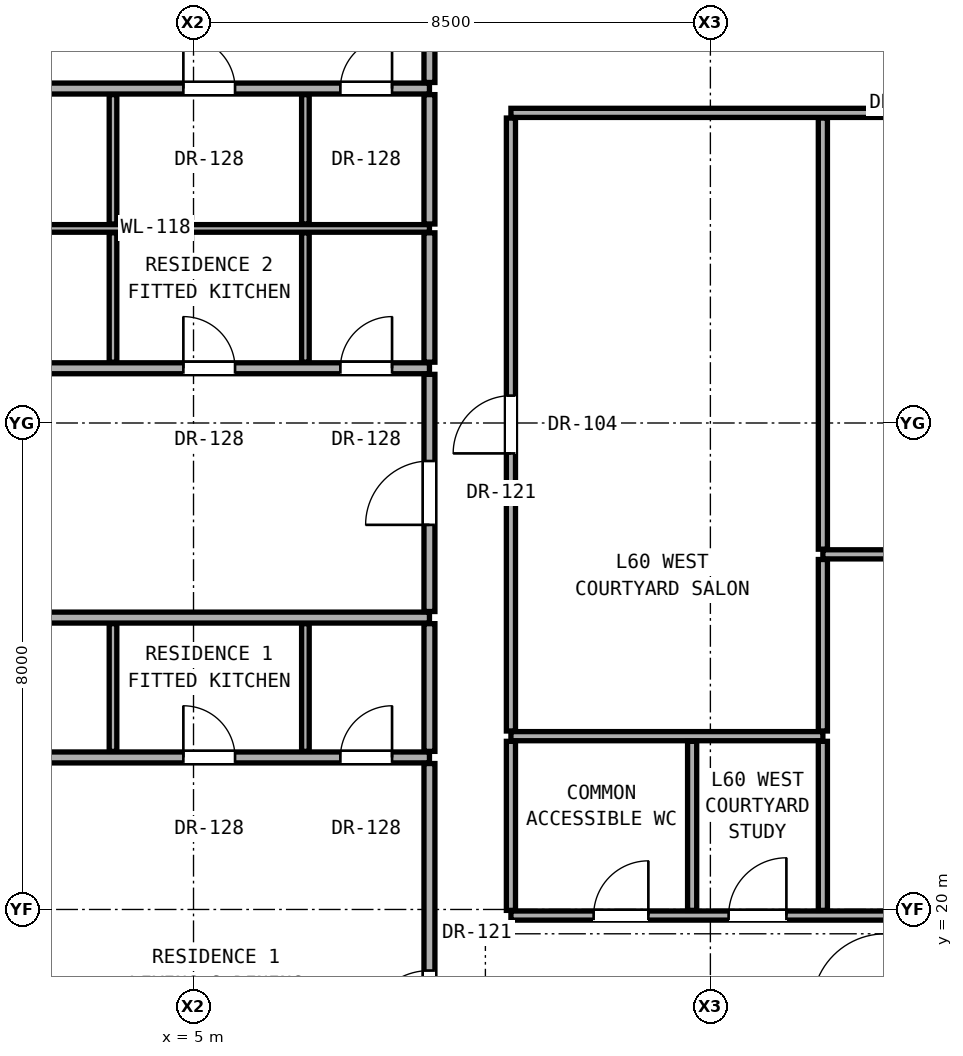
"""IFC4 building model, lengths in metres.
Left out: names, types, materials, properties, quantities, classifications, styles, units other than length and angle.
Written with IfcOpenShell. Run it as: python <this file> out.ifc"""

import sys

from ifc_helpers import new_model, si_unit, direction, frame, frame_2d, origin, place, context, subcontext, project, spatial, rectangle, extrude, element, fill, save


model = new_model("IFC4")
c1 = context("Model", 3, precision=1e-05, world=origin(), true_north=direction((0.0, 1.0)))
c2 = subcontext(c1, "Body", "Model", "MODEL_VIEW")
j1 = project(units=[si_unit("LENGTHUNIT", "METRE"), si_unit("PLANEANGLEUNIT", "RADIAN")], contexts=[c1])
p1 = place(None, origin())
s1 = spatial("IfcSite", under=j1, at=p1, CompositionType="ELEMENT")
p2 = place(p1, origin())
s2 = spatial("IfcBuilding", under=s1, at=p2, CompositionType="ELEMENT")
p3 = place(p2, frame((0.0, 0.0, 209.65)))
s3 = spatial("IfcBuildingStorey", under=s2, at=p3, CompositionType="ELEMENT", Elevation=209.65)
p4 = place(p3, frame((10.22, 19.9, 0.0), z_axis=(0.0, 0.0, 1.0), x_axis=(1.0, 0.0, 0.0)))
e1 = element("IfcWall", 1, at=p4, inside=s3, PredefinedType="PARTITIONING", context=c2, shape_type="SweptSolid", body=[
    extrude(rectangle(XDim=20.56, YDim=0.15, at=frame_2d((10.28, 0.0))), origin(), (0.0, 0.0, 1.0), 2.266),
])
p5 = place(p4, frame((1.36, 0.0, 0.0)))
e2 = element("IfcOpeningElement", 2, at=p5, cuts=e1, PredefinedType="OPENING", context=c2, shape_type="SweptSolid", body=[
    extrude(rectangle(XDim=0.9, YDim=2.1, at=frame_2d((0.45, 1.05))), frame((0.0, 0.085, 0.0), z_axis=(0.0, -1.0, 0.0), x_axis=(1.0, 0.0, 0.0)), (0.0, 0.0, 1.0), 0.17),
])
p6 = place(p4, frame((3.58, 0.0, 0.0)))
e3 = element("IfcOpeningElement", 3, at=p6, cuts=e1, PredefinedType="OPENING", context=c2, shape_type="SweptSolid", body=[
    extrude(rectangle(XDim=0.95, YDim=2.15, at=frame_2d((0.475, 1.075))), frame((0.0, 0.085, 0.0), z_axis=(0.0, -1.0, 0.0), x_axis=(1.0, 0.0, 0.0)), (0.0, 0.0, 1.0), 0.17),
])
p7 = place(p4, frame((8.926, 0.0, 0.0)))
e4 = element("IfcOpeningElement", 4, at=p7, cuts=e1, PredefinedType="OPENING", context=c2, shape_type="SweptSolid", body=[
    extrude(rectangle(XDim=1.05, YDim=2.2, at=frame_2d((0.525, 1.1))), frame((0.0, 0.085, 0.0), z_axis=(0.0, -1.0, 0.0), x_axis=(1.0, 0.0, 0.0)), (0.0, 0.0, 1.0), 0.17),
])
p8 = place(p4, frame((16.621, 0.0, 0.0)))
e5 = element("IfcOpeningElement", 5, at=p8, cuts=e1, PredefinedType="OPENING", context=c2, shape_type="SweptSolid", body=[
    extrude(rectangle(XDim=1.05, YDim=2.2, at=frame_2d((0.525, 1.1))), frame((0.0, 0.085, 0.0), z_axis=(0.0, -1.0, 0.0), x_axis=(1.0, 0.0, 0.0)), (0.0, 0.0, 1.0), 0.17),
])
p9 = place(p3, frame((-1.07, 22.5, 0.0), z_axis=(0.0, 0.0, 1.0), x_axis=(1.0, 0.0, 0.0)))
e6 = element("IfcWall", 6, at=p9, inside=s3, PredefinedType="PARTITIONING", context=c2, shape_type="SweptSolid", body=[
    extrude(rectangle(XDim=9.95, YDim=0.18, at=frame_2d((4.975, 0.0))), origin(), (0.0, 0.0, 1.0), 2.109),
])
p10 = place(p9, frame((1.968, 0.0, 0.0)))
e7 = element("IfcOpeningElement", 7, at=p10, cuts=e6, PredefinedType="OPENING", context=c2, shape_type="SweptSolid", body=[
    extrude(rectangle(XDim=0.85, YDim=2.01, at=frame_2d((0.425, 1.005))), frame((0.0, 0.1, 0.0), z_axis=(0.0, -1.0, 0.0), x_axis=(1.0, 0.0, 0.0)), (0.0, 0.0, 1.0), 0.2),
])
p11 = place(p9, frame((5.903, 0.0, 0.0)))
e8 = element("IfcOpeningElement", 8, at=p11, cuts=e6, PredefinedType="OPENING", context=c2, shape_type="SweptSolid", body=[
    extrude(rectangle(XDim=0.85, YDim=2.01, at=frame_2d((0.425, 1.005))), frame((0.0, 0.1, 0.0), z_axis=(0.0, -1.0, 0.0), x_axis=(1.0, 0.0, 0.0)), (0.0, 0.0, 1.0), 0.2),
])
p12 = place(p9, frame((8.485, 0.0, 0.0)))
e9 = element("IfcOpeningElement", 9, at=p12, cuts=e6, PredefinedType="OPENING", context=c2, shape_type="SweptSolid", body=[
    extrude(rectangle(XDim=0.85, YDim=2.01, at=frame_2d((0.425, 1.005))), frame((0.0, 0.1, 0.0), z_axis=(0.0, -1.0, 0.0), x_axis=(1.0, 0.0, 0.0)), (0.0, 0.0, 1.0), 0.2),
])
p13 = place(p3, frame((10.22, 22.85, 0.0), z_axis=(0.0, 0.0, 1.0), x_axis=(1.0, 0.0, 0.0)))
e10 = element("IfcWall", 10, at=p13, inside=s3, PredefinedType="PARTITIONING", context=c2, shape_type="SweptSolid", body=[
    extrude(rectangle(XDim=5.13, YDim=0.15, at=frame_2d((2.565, 0.0))), origin(), (0.0, 0.0, 1.0), 2.266),
])
p14 = place(p3, frame((-1.07, 24.8, 0.0), z_axis=(0.0, 0.0, 1.0), x_axis=(1.0, 0.0, 0.0)))
e11 = element("IfcWall", 11, at=p14, inside=s3, PredefinedType="PARTITIONING", context=c2, shape_type="SweptSolid", body=[
    extrude(rectangle(XDim=9.95, YDim=0.18, at=frame_2d((4.975, 0.0))), origin(), (0.0, 0.0, 1.0), 2.109),
])
p15 = place(p3, frame((15.35, 25.84, 0.0), z_axis=(0.0, 0.0, 1.0), x_axis=(1.0, 0.0, 0.0)))
e12 = element("IfcWall", 12, at=p15, inside=s3, PredefinedType="PARTITIONING", context=c2, shape_type="SweptSolid", body=[
    extrude(rectangle(XDim=15.43, YDim=0.15, at=frame_2d((7.715, 0.0))), origin(), (0.0, 0.0, 1.0), 2.266),
])
p16 = place(p3, frame((-1.07, 28.9, 0.0), z_axis=(0.0, 0.0, 1.0), x_axis=(1.0, 0.0, 0.0)))
e13 = element("IfcWall", 13, at=p16, inside=s3, PredefinedType="PARTITIONING", context=c2, shape_type="SweptSolid", body=[
    extrude(rectangle(XDim=9.95, YDim=0.18, at=frame_2d((4.975, 0.0))), origin(), (0.0, 0.0, 1.0), 2.109),
])
p17 = place(p16, frame((1.968, 0.0, 0.0)))
e14 = element("IfcOpeningElement", 14, at=p17, cuts=e13, PredefinedType="OPENING", context=c2, shape_type="SweptSolid", body=[
    extrude(rectangle(XDim=0.85, YDim=2.01, at=frame_2d((0.425, 1.005))), frame((0.0, 0.1, 0.0), z_axis=(0.0, -1.0, 0.0), x_axis=(1.0, 0.0, 0.0)), (0.0, 0.0, 1.0), 0.2),
])
p18 = place(p16, frame((5.903, 0.0, 0.0)))
e15 = element("IfcOpeningElement", 15, at=p18, cuts=e13, PredefinedType="OPENING", context=c2, shape_type="SweptSolid", body=[
    extrude(rectangle(XDim=0.85, YDim=2.01, at=frame_2d((0.425, 1.005))), frame((0.0, 0.1, 0.0), z_axis=(0.0, -1.0, 0.0), x_axis=(1.0, 0.0, 0.0)), (0.0, 0.0, 1.0), 0.2),
])
p19 = place(p16, frame((8.485, 0.0, 0.0)))
e16 = element("IfcOpeningElement", 16, at=p19, cuts=e13, PredefinedType="OPENING", context=c2, shape_type="SweptSolid", body=[
    extrude(rectangle(XDim=0.85, YDim=2.01, at=frame_2d((0.425, 1.005))), frame((0.0, 0.1, 0.0), z_axis=(0.0, -1.0, 0.0), x_axis=(1.0, 0.0, 0.0)), (0.0, 0.0, 1.0), 0.2),
])
p20 = place(p3, frame((-1.07, 31.2, 0.0), z_axis=(0.0, 0.0, 1.0), x_axis=(1.0, 0.0, 0.0)))
e17 = element("IfcWall", 17, at=p20, inside=s3, PredefinedType="PARTITIONING", context=c2, shape_type="SweptSolid", body=[
    extrude(rectangle(XDim=9.95, YDim=0.125, at=frame_2d((4.975, 0.0))), origin(), (0.0, 0.0, 1.0), 2.109),
])
p21 = place(p3, frame((10.22, 33.1, 0.0), z_axis=(0.0, 0.0, 1.0), x_axis=(1.0, 0.0, 0.0)))
e18 = element("IfcWall", 18, at=p21, inside=s3, PredefinedType="PARTITIONING", context=c2, shape_type="SweptSolid", body=[
    extrude(rectangle(XDim=20.56, YDim=0.15, at=frame_2d((10.28, 0.0))), origin(), (0.0, 0.0, 1.0), 2.266),
])
p22 = place(p21, frame((8.926, 0.0, 0.0)))
e19 = element("IfcOpeningElement", 19, at=p22, cuts=e18, PredefinedType="OPENING", context=c2, shape_type="SweptSolid", body=[
    extrude(rectangle(XDim=1.05, YDim=2.2, at=frame_2d((0.525, 1.1))), frame((0.0, 0.085, 0.0), z_axis=(0.0, -1.0, 0.0), x_axis=(1.0, 0.0, 0.0)), (0.0, 0.0, 1.0), 0.17),
])
p23 = place(p21, frame((16.621, 0.0, 0.0)))
e20 = element("IfcOpeningElement", 20, at=p23, cuts=e18, PredefinedType="OPENING", context=c2, shape_type="SweptSolid", body=[
    extrude(rectangle(XDim=1.05, YDim=2.2, at=frame_2d((0.525, 1.1))), frame((0.0, 0.085, 0.0), z_axis=(0.0, -1.0, 0.0), x_axis=(1.0, 0.0, 0.0)), (0.0, 0.0, 1.0), 0.17),
])
p24 = place(p3, frame((-1.07, 33.5, 0.0), z_axis=(0.0, 0.0, 1.0), x_axis=(1.0, 0.0, 0.0)))
e21 = element("IfcWall", 21, at=p24, inside=s3, PredefinedType="PARTITIONING", context=c2, shape_type="SweptSolid", body=[
    extrude(rectangle(XDim=9.95, YDim=0.18, at=frame_2d((4.975, 0.0))), origin(), (0.0, 0.0, 1.0), 2.109),
])
p25 = place(p24, frame((1.968, 0.0, 0.0)))
e22 = element("IfcOpeningElement", 22, at=p25, cuts=e21, PredefinedType="OPENING", context=c2, shape_type="SweptSolid", body=[
    extrude(rectangle(XDim=0.85, YDim=2.01, at=frame_2d((0.425, 1.005))), frame((0.0, 0.1, 0.0), z_axis=(0.0, -1.0, 0.0), x_axis=(1.0, 0.0, 0.0)), (0.0, 0.0, 1.0), 0.2),
])
p26 = place(p24, frame((5.903, 0.0, 0.0)))
e23 = element("IfcOpeningElement", 23, at=p26, cuts=e21, PredefinedType="OPENING", context=c2, shape_type="SweptSolid", body=[
    extrude(rectangle(XDim=0.85, YDim=2.01, at=frame_2d((0.425, 1.005))), frame((0.0, 0.1, 0.0), z_axis=(0.0, -1.0, 0.0), x_axis=(1.0, 0.0, 0.0)), (0.0, 0.0, 1.0), 0.2),
])
p27 = place(p24, frame((8.485, 0.0, 0.0)))
e24 = element("IfcOpeningElement", 24, at=p27, cuts=e21, PredefinedType="OPENING", context=c2, shape_type="SweptSolid", body=[
    extrude(rectangle(XDim=0.85, YDim=2.01, at=frame_2d((0.425, 1.005))), frame((0.0, 0.1, 0.0), z_axis=(0.0, -1.0, 0.0), x_axis=(1.0, 0.0, 0.0)), (0.0, 0.0, 1.0), 0.2),
])
p28 = place(p3, frame((3.676, 22.6, 0.0), z_axis=(0.0, 0.0, 1.0), x_axis=(0.0, 1.0, 0.0)))
e25 = element("IfcWall", 25, at=p28, inside=s3, PredefinedType="PARTITIONING", context=c2, shape_type="SweptSolid", body=[
    extrude(rectangle(XDim=2.1, YDim=0.125, at=frame_2d((1.05, 0.0))), origin(), (0.0, 0.0, 1.0), 2.266),
])
for number, where, z_axis, x_axis in (
    (26, (3.676, 29.0, 0.0), (0.0, 0.0, 1.0), (0.0, 1.0, 0.0)),
    (27, (3.676, 31.272, 0.0), (0.0, 0.0, 1.0), (0.0, 1.0, 0.0)),
):
    element("IfcWall", number, at=place(p3, frame(where, z_axis=z_axis, x_axis=x_axis)), inside=s3, PredefinedType="PARTITIONING", context=c2, shape_type="SweptSolid", body=[
        extrude(rectangle(XDim=2.127, YDim=0.125, at=frame_2d((1.064, 0.0))), origin(), (0.0, 0.0, 1.0), 2.266),
    ])
p29 = place(p3, frame((6.84, 22.6, 0.0), z_axis=(0.0, 0.0, 1.0), x_axis=(0.0, 1.0, 0.0)))
e28 = element("IfcWall", 28, at=p29, inside=s3, PredefinedType="PARTITIONING", context=c2, shape_type="SweptSolid", body=[
    extrude(rectangle(XDim=2.1, YDim=0.125, at=frame_2d((1.05, 0.0))), origin(), (0.0, 0.0, 1.0), 2.266),
])
for number, where, z_axis, x_axis in (
    (29, (6.84, 29.0, 0.0), (0.0, 0.0, 1.0), (0.0, 1.0, 0.0)),
    (30, (6.84, 31.272, 0.0), (0.0, 0.0, 1.0), (0.0, 1.0, 0.0)),
):
    element("IfcWall", number, at=place(p3, frame(where, z_axis=z_axis, x_axis=x_axis)), inside=s3, PredefinedType="PARTITIONING", context=c2, shape_type="SweptSolid", body=[
        extrude(rectangle(XDim=2.127, YDim=0.125, at=frame_2d((1.064, 0.0))), origin(), (0.0, 0.0, 1.0), 2.266),
    ])
p30 = place(p3, frame((8.88, 14.541, 0.0), z_axis=(0.0, 0.0, 1.0), x_axis=(0.0, 1.0, 0.0)))
e31 = element("IfcWall", 31, at=p30, inside=s3, PredefinedType="PARTITIONING", context=c2, shape_type="SweptSolid", body=[
    extrude(rectangle(XDim=7.859, YDim=0.18, at=frame_2d((3.929, 0.0))), origin(), (0.0, 0.0, 1.0), 2.282),
])
p31 = place(p30, frame((3.405, 0.0, 0.0)))
e32 = element("IfcOpeningElement", 32, at=p31, cuts=e31, PredefinedType="OPENING", context=c2, shape_type="SweptSolid", body=[
    extrude(rectangle(XDim=1.05, YDim=2.2, at=frame_2d((0.525, 1.1))), frame((0.0, 0.1, 0.0), z_axis=(0.0, -1.0, 0.0), x_axis=(1.0, 0.0, 0.0)), (0.0, 0.0, 1.0), 0.2),
])
p32 = place(p3, frame((8.88, 22.6, 0.0), z_axis=(0.0, 0.0, 1.0), x_axis=(0.0, 1.0, 0.0)))
e33 = element("IfcWall", 33, at=p32, inside=s3, PredefinedType="PARTITIONING", context=c2, shape_type="SweptSolid", body=[
    extrude(rectangle(XDim=2.1, YDim=0.18, at=frame_2d((1.05, 0.0))), origin(), (0.0, 0.0, 1.0), 2.266),
])
p33 = place(p3, frame((8.88, 24.9, 0.0), z_axis=(0.0, 0.0, 1.0), x_axis=(0.0, 1.0, 0.0)))
e34 = element("IfcWall", 34, at=p33, inside=s3, PredefinedType="PARTITIONING", context=c2, shape_type="SweptSolid", body=[
    extrude(rectangle(XDim=3.9, YDim=0.18, at=frame_2d((1.95, 0.0))), origin(), (0.0, 0.0, 1.0), 2.266),
])
p34 = place(p33, frame((1.425, 0.0, 0.0)))
e35 = element("IfcOpeningElement", 35, at=p34, cuts=e34, PredefinedType="OPENING", context=c2, shape_type="SweptSolid", body=[
    extrude(rectangle(XDim=1.05, YDim=2.2, at=frame_2d((0.525, 1.1))), frame((0.0, 0.1, 0.0), z_axis=(0.0, -1.0, 0.0), x_axis=(1.0, 0.0, 0.0)), (0.0, 0.0, 1.0), 0.2),
])
for number, where, z_axis, x_axis in (
    (36, (8.88, 29.0, 0.0), (0.0, 0.0, 1.0), (0.0, 1.0, 0.0)),
    (37, (8.88, 31.272, 0.0), (0.0, 0.0, 1.0), (0.0, 1.0, 0.0)),
):
    element("IfcWall", number, at=place(p3, frame(where, z_axis=z_axis, x_axis=x_axis)), inside=s3, PredefinedType="PARTITIONING", context=c2, shape_type="SweptSolid", body=[
        extrude(rectangle(XDim=2.127, YDim=0.18, at=frame_2d((1.064, 0.0))), origin(), (0.0, 0.0, 1.0), 2.266),
    ])
p35 = place(p3, frame((8.88, 33.6, 0.0), z_axis=(0.0, 0.0, 1.0), x_axis=(0.0, 1.0, 0.0)))
e38 = element("IfcWall", 38, at=p35, inside=s3, PredefinedType="PARTITIONING", context=c2, shape_type="SweptSolid", body=[
    extrude(rectangle(XDim=7.859, YDim=0.18, at=frame_2d((3.929, 0.0))), origin(), (0.0, 0.0, 1.0), 2.282),
])
p36 = place(p35, frame((3.405, 0.0, 0.0)))
e39 = element("IfcOpeningElement", 39, at=p36, cuts=e38, PredefinedType="OPENING", context=c2, shape_type="SweptSolid", body=[
    extrude(rectangle(XDim=1.05, YDim=2.2, at=frame_2d((0.525, 1.1))), frame((0.0, 0.1, 0.0), z_axis=(0.0, -1.0, 0.0), x_axis=(1.0, 0.0, 0.0)), (0.0, 0.0, 1.0), 0.2),
])
p37 = place(p3, frame((10.22, 19.985, 0.0), z_axis=(0.0, 0.0, 1.0), x_axis=(0.0, 1.0, 0.0)))
e40 = element("IfcWall", 40, at=p37, inside=s3, PredefinedType="PARTITIONING", context=c2, shape_type="SweptSolid", body=[
    extrude(rectangle(XDim=2.78, YDim=0.15, at=frame_2d((1.39, 0.0))), origin(), (0.0, 0.0, 1.0), 2.89),
])
p38 = place(p3, frame((10.22, 22.935, 0.0), z_axis=(0.0, 0.0, 1.0), x_axis=(0.0, 1.0, 0.0)))
e41 = element("IfcWall", 41, at=p38, inside=s3, PredefinedType="PARTITIONING", context=c2, shape_type="SweptSolid", body=[
    extrude(rectangle(XDim=10.08, YDim=0.15, at=frame_2d((5.04, 0.0))), origin(), (0.0, 0.0, 1.0), 2.266),
])
p39 = place(p38, frame((4.565, 0.0, 0.0)))
e42 = element("IfcOpeningElement", 42, at=p39, cuts=e41, PredefinedType="OPENING", context=c2, shape_type="SweptSolid", body=[
    extrude(rectangle(XDim=0.95, YDim=2.15, at=frame_2d((0.475, 1.075))), frame((0.0, 0.085, 0.0), z_axis=(0.0, -1.0, 0.0), x_axis=(1.0, 0.0, 0.0)), (0.0, 0.0, 1.0), 0.17),
])
for number, where, z_axis, x_axis in (
    (43, (13.2, 19.985, 0.0), (0.0, 0.0, 1.0), (0.0, 1.0, 0.0)),
    (44, (15.35, 19.985, 0.0), (0.0, 0.0, 1.0), (0.0, 1.0, 0.0)),
):
    element("IfcWall", number, at=place(p3, frame(where, z_axis=z_axis, x_axis=x_axis)), inside=s3, PredefinedType="PARTITIONING", context=c2, shape_type="SweptSolid", body=[
        extrude(rectangle(XDim=2.78, YDim=0.15, at=frame_2d((1.39, 0.0))), origin(), (0.0, 0.0, 1.0), 2.89),
    ])
p40 = place(p3, frame((15.35, 22.935, 0.0), z_axis=(0.0, 0.0, 1.0), x_axis=(0.0, 1.0, 0.0)))
e45 = element("IfcWall", 45, at=p40, inside=s3, PredefinedType="PARTITIONING", context=c2, shape_type="SweptSolid", body=[
    extrude(rectangle(XDim=2.82, YDim=0.15, at=frame_2d((1.41, 0.0))), origin(), (0.0, 0.0, 1.0), 2.266),
])
p41 = place(p3, frame((15.35, 25.925, 0.0), z_axis=(0.0, 0.0, 1.0), x_axis=(0.0, 1.0, 0.0)))
e46 = element("IfcWall", 46, at=p41, inside=s3, PredefinedType="PARTITIONING", context=c2, shape_type="SweptSolid", body=[
    extrude(rectangle(XDim=7.09, YDim=0.15, at=frame_2d((3.545, 0.0))), origin(), (0.0, 0.0, 1.0), 2.266),
])
p42 = place(p5, origin())
e47 = element("IfcDoor", 47, at=p42, inside=s3, OperationType="SINGLE_SWING_RIGHT", PredefinedType="DOOR", context=c2, shape_type="SweptSolid", body=[
    extrude(rectangle(XDim=0.9, YDim=2.1, at=frame_2d((0.45, 1.05))), frame((0.0, 0.025, 0.0), z_axis=(0.0, -1.0, 0.0), x_axis=(1.0, 0.0, 0.0)), (0.0, 0.0, 1.0), 0.05),
])
fill(e2, e47)
p43 = place(p31, origin())
e48 = element("IfcDoor", 48, at=p43, inside=s3, OperationType="SINGLE_SWING_LEFT", PredefinedType="DOOR", context=c2, shape_type="SweptSolid", body=[
    extrude(rectangle(XDim=1.05, YDim=2.2, at=frame_2d((0.525, 1.1))), frame((0.0, 0.025, 0.0), z_axis=(0.0, -1.0, 0.0), x_axis=(1.0, 0.0, 0.0)), (0.0, 0.0, 1.0), 0.05),
])
fill(e32, e48)
p44 = place(p11, origin())
e49 = element("IfcDoor", 49, at=p44, inside=s3, OperationType="SINGLE_SWING_LEFT", PredefinedType="DOOR", context=c2, shape_type="SweptSolid", body=[
    extrude(rectangle(XDim=0.85, YDim=2.01, at=frame_2d((0.425, 1.005))), frame((0.0, 0.025, 0.0), z_axis=(0.0, -1.0, 0.0), x_axis=(1.0, 0.0, 0.0)), (0.0, 0.0, 1.0), 0.05),
])
fill(e8, e49)
p45 = place(p12, origin())
e50 = element("IfcDoor", 50, at=p45, inside=s3, OperationType="SINGLE_SWING_RIGHT", PredefinedType="DOOR", context=c2, shape_type="SweptSolid", body=[
    extrude(rectangle(XDim=0.85, YDim=2.01, at=frame_2d((0.425, 1.005))), frame((0.0, 0.025, 0.0), z_axis=(0.0, -1.0, 0.0), x_axis=(1.0, 0.0, 0.0)), (0.0, 0.0, 1.0), 0.05),
])
fill(e9, e50)
p46 = place(p34, origin())
e51 = element("IfcDoor", 51, at=p46, inside=s3, OperationType="SINGLE_SWING_LEFT", PredefinedType="DOOR", context=c2, shape_type="SweptSolid", body=[
    extrude(rectangle(XDim=1.05, YDim=2.2, at=frame_2d((0.525, 1.1))), frame((0.0, 0.025, 0.0), z_axis=(0.0, -1.0, 0.0), x_axis=(1.0, 0.0, 0.0)), (0.0, 0.0, 1.0), 0.05),
])
fill(e35, e51)
p47 = place(p18, origin())
e52 = element("IfcDoor", 52, at=p47, inside=s3, OperationType="SINGLE_SWING_LEFT", PredefinedType="DOOR", context=c2, shape_type="SweptSolid", body=[
    extrude(rectangle(XDim=0.85, YDim=2.01, at=frame_2d((0.425, 1.005))), frame((0.0, 0.025, 0.0), z_axis=(0.0, -1.0, 0.0), x_axis=(1.0, 0.0, 0.0)), (0.0, 0.0, 1.0), 0.05),
])
fill(e15, e52)
p48 = place(p19, origin())
e53 = element("IfcDoor", 53, at=p48, inside=s3, OperationType="SINGLE_SWING_RIGHT", PredefinedType="DOOR", context=c2, shape_type="SweptSolid", body=[
    extrude(rectangle(XDim=0.85, YDim=2.01, at=frame_2d((0.425, 1.005))), frame((0.0, 0.025, 0.0), z_axis=(0.0, -1.0, 0.0), x_axis=(1.0, 0.0, 0.0)), (0.0, 0.0, 1.0), 0.05),
])
fill(e16, e53)
p49 = place(p26, origin())
e54 = element("IfcDoor", 54, at=p49, inside=s3, OperationType="SINGLE_SWING_LEFT", PredefinedType="DOOR", context=c2, shape_type="SweptSolid", body=[
    extrude(rectangle(XDim=0.85, YDim=2.01, at=frame_2d((0.425, 1.005))), frame((0.0, 0.025, 0.0), z_axis=(0.0, -1.0, 0.0), x_axis=(1.0, 0.0, 0.0)), (0.0, 0.0, 1.0), 0.05),
])
fill(e23, e54)
p50 = place(p27, origin())
e55 = element("IfcDoor", 55, at=p50, inside=s3, OperationType="SINGLE_SWING_RIGHT", PredefinedType="DOOR", context=c2, shape_type="SweptSolid", body=[
    extrude(rectangle(XDim=0.85, YDim=2.01, at=frame_2d((0.425, 1.005))), frame((0.0, 0.025, 0.0), z_axis=(0.0, -1.0, 0.0), x_axis=(1.0, 0.0, 0.0)), (0.0, 0.0, 1.0), 0.05),
])
fill(e24, e55)
p51 = place(p6, origin())
e56 = element("IfcDoor", 56, at=p51, inside=s3, OperationType="SINGLE_SWING_RIGHT", PredefinedType="DOOR", context=c2, shape_type="SweptSolid", body=[
    extrude(rectangle(XDim=0.95, YDim=2.15, at=frame_2d((0.475, 1.075))), frame((0.0, 0.025, 0.0), z_axis=(0.0, -1.0, 0.0), x_axis=(1.0, 0.0, 0.0)), (0.0, 0.0, 1.0), 0.05),
])
fill(e3, e56)
p52 = place(p39, origin())
e57 = element("IfcDoor", 57, at=p52, inside=s3, OperationType="SINGLE_SWING_LEFT", PredefinedType="DOOR", context=c2, shape_type="SweptSolid", body=[
    extrude(rectangle(XDim=0.95, YDim=2.15, at=frame_2d((0.475, 1.075))), frame((0.0, 0.025, 0.0), z_axis=(0.0, -1.0, 0.0), x_axis=(1.0, 0.0, 0.0)), (0.0, 0.0, 1.0), 0.05),
])
fill(e42, e57)
save(model, sys.argv[1])
